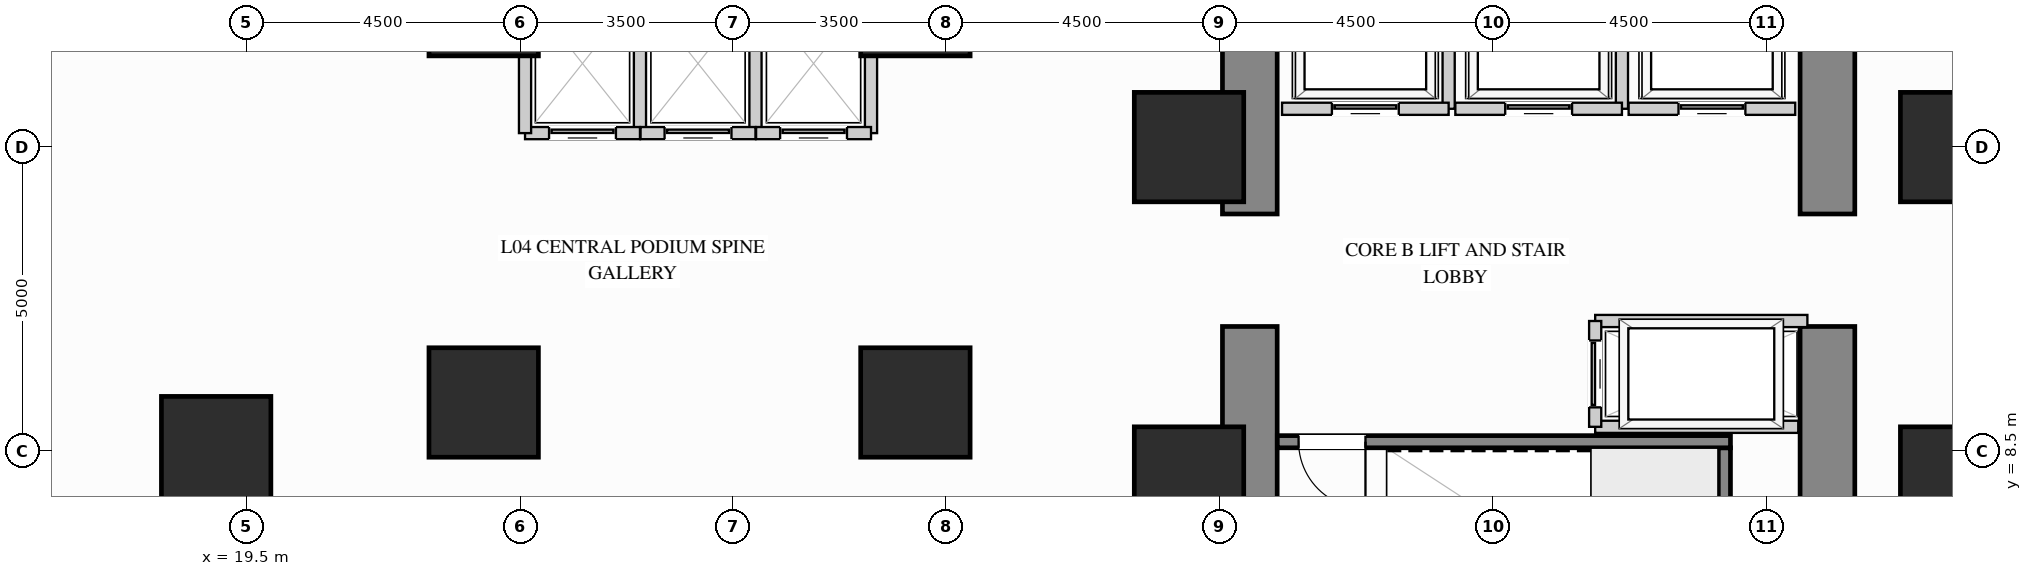
"""IFC4 building model, lengths in metres.
Left out: names, types, materials, properties, quantities, classifications, styles, units other than length and angle.
Written with IfcOpenShell. Run it as: python <this file> out.ifc"""

import sys

from ifc_helpers import new_model, si_unit, direction, frame, frame_2d, origin, origin_2d, place, context, subcontext, project, spatial, rectangle, extrude, source, transform, mapped, element, fill, save


model = new_model("IFC4")
c1 = context("Model", 3, precision=1e-05, world=origin(), true_north=direction((0.0, 1.0)))
c2 = subcontext(c1, "Body", "Model", "MODEL_VIEW")
j1 = project(units=[si_unit("LENGTHUNIT", "METRE"), si_unit("PLANEANGLEUNIT", "RADIAN")], contexts=[c1])
p1 = place(None, origin())
s1 = spatial("IfcSite", under=j1, at=p1, CompositionType="ELEMENT")
p2 = place(p1, origin())
s2 = spatial("IfcBuilding", under=s1, at=p2, CompositionType="ELEMENT")
p3 = place(p2, frame((0.0, 0.0, 18.0)))
s3 = spatial("IfcBuildingStorey", under=s2, at=p3, CompositionType="ELEMENT", Elevation=18.0)
m1 = source(origin(), c2, "Body", "SweptSolid", [
    extrude(rectangle(XDim=1.8, YDim=1.8, at=origin_2d()), origin(), (0.0, 0.0, 1.0), 4.28),
])
for number, where, z_axis, x_axis in (
    (1, (47.6, 8.0, 0.0), (0.0, 0.0, 1.0), (1.0, 0.0, 0.0)),
    (2, (47.6, 13.5, 0.0), (0.0, 0.0, 1.0), (1.0, 0.0, 0.0)),
    (3, (19.0, 8.5, 0.0), (0.0, 0.0, 1.0), (1.0, 0.0, 0.0)),
    (4, (35.0, 8.0, 0.0), (0.0, 0.0, 1.0), (1.0, 0.0, 0.0)),
    (5, (35.0, 13.5, 0.0), (0.0, 0.0, 1.0), (1.0, 0.0, 0.0)),
    (6, (23.4, 9.3, 0.0), (0.0, 0.0, 1.0), (1.0, 0.0, 0.0)),
    (7, (30.5, 9.3, 0.0), (0.0, 0.0, 1.0), (1.0, 0.0, 0.0)),
    (8, (23.4, 15.9, 0.0), (0.0, 0.0, 1.0), (1.0, 0.0, 0.0)),
    (9, (30.5, 15.9, 0.0), (0.0, 0.0, 1.0), (1.0, 0.0, 0.0)),
):
    element("IfcColumn", number, at=place(p3, frame(where, z_axis=z_axis, x_axis=x_axis)), inside=s3, PredefinedType="COLUMN", context=c2, shape_type="MappedRepresentation", body=[
        mapped(m1, transform((0.0, 0.0, 0.0), x_axis=(1.0, 0.0, 0.0), y_axis=(0.0, 1.0, 0.0), z_axis=(0.0, 0.0, 1.0))),
    ])
m2 = source(origin(), c2, "Body", "SweptSolid", [
    extrude(rectangle(XDim=5.6, YDim=0.9, at=frame_2d((2.8, 0.0))), origin(), (0.0, 0.0, 1.0), 4.28),
])
p4 = place(p3, frame((45.5, 4.95, 0.0), z_axis=(0.0, 0.0, 1.0), x_axis=(0.0, 1.0, 0.0)))
e10 = element("IfcWall", 10, at=p4, inside=s3, PredefinedType="SHEAR", context=c2, shape_type="MappedRepresentation", body=[
    mapped(m2, transform((0.0, 0.0, 0.0), x_axis=(1.0, 0.0, 0.0), y_axis=(0.0, 1.0, 0.0), z_axis=(0.0, 0.0, 1.0))),
])
m3 = source(origin(), c2, "Body", "SweptSolid", [
    extrude(rectangle(XDim=3.65, YDim=0.9, at=frame_2d((1.825, 0.0))), origin(), (0.0, 0.0, 1.0), 4.28),
])
p5 = place(p3, frame((45.5, 12.4, 0.0), z_axis=(0.0, 0.0, 1.0), x_axis=(0.0, 1.0, 0.0)))
e11 = element("IfcWall", 11, at=p5, inside=s3, PredefinedType="SHEAR", context=c2, shape_type="MappedRepresentation", body=[
    mapped(m3, transform((0.0, 0.0, 0.0), x_axis=(1.0, 0.0, 0.0), y_axis=(0.0, 1.0, 0.0), z_axis=(0.0, 0.0, 1.0))),
])
p6 = place(p3, frame((36.0, 4.95, 0.0), z_axis=(0.0, 0.0, 1.0), x_axis=(0.0, 1.0, 0.0)))
e12 = element("IfcWall", 12, at=p6, inside=s3, PredefinedType="SHEAR", context=c2, shape_type="MappedRepresentation", body=[
    mapped(m2, transform((0.0, 0.0, 0.0), x_axis=(1.0, 0.0, 0.0), y_axis=(0.0, 1.0, 0.0), z_axis=(0.0, 0.0, 1.0))),
])
p7 = place(p3, frame((36.0, 12.4, 0.0), z_axis=(0.0, 0.0, 1.0), x_axis=(0.0, 1.0, 0.0)))
e13 = element("IfcWall", 13, at=p7, inside=s3, PredefinedType="SHEAR", context=c2, shape_type="MappedRepresentation", body=[
    mapped(m3, transform((0.0, 0.0, 0.0), x_axis=(1.0, 0.0, 0.0), y_axis=(0.0, 1.0, 0.0), z_axis=(0.0, 0.0, 1.0))),
])
m4 = source(origin(), c2, "Body", "SweptSolid", [
    extrude(rectangle(XDim=1.89, YDim=0.2, at=frame_2d((0.945, 0.0))), origin(), (0.0, 0.0, 1.0), 4.265),
])
p8 = place(p3, frame((39.27, 14.13, 0.0), z_axis=(0.0, 0.0, 1.0), x_axis=(0.0, 1.0, 0.0)))
e14 = element("IfcWall", 14, at=p8, inside=s3, PredefinedType="PARTITIONING", context=c2, shape_type="MappedRepresentation", body=[
    mapped(m4, transform((0.0, 0.0, 0.0), x_axis=(1.0, 0.0, 0.0), y_axis=(0.0, 1.0, 0.0), z_axis=(0.0, 0.0, 1.0))),
])
p9 = place(p3, frame((36.53, 14.13, 0.0), z_axis=(0.0, 0.0, 1.0), x_axis=(1.0, 0.0, 0.0)))
e15 = element("IfcWall", 15, at=p9, inside=s3, PredefinedType="PARTITIONING", context=c2, shape_type="SweptSolid", body=[
    extrude(rectangle(XDim=2.74, YDim=0.2, at=frame_2d((1.37, 0.0))), origin(), (0.0, 0.0, 1.0), 4.265),
])
p10 = place(p9, frame((0.82, 0.0, 0.0)))
e16 = element("IfcOpeningElement", 16, at=p10, cuts=e15, PredefinedType="OPENING", context=c2, shape_type="SweptSolid", body=[
    extrude(rectangle(XDim=1.1, YDim=2.2, at=frame_2d((0.55, 1.1))), frame((0.0, 0.11, 0.0), z_axis=(0.0, -1.0, 0.0), x_axis=(1.0, 0.0, 0.0)), (0.0, 0.0, 1.0), 0.22),
])
p11 = place(p3, frame((42.12, 14.13, 0.0), z_axis=(0.0, 0.0, 1.0), x_axis=(0.0, 1.0, 0.0)))
e17 = element("IfcWall", 17, at=p11, inside=s3, PredefinedType="PARTITIONING", context=c2, shape_type="MappedRepresentation", body=[
    mapped(m4, transform((0.0, 0.0, 0.0), x_axis=(1.0, 0.0, 0.0), y_axis=(0.0, 1.0, 0.0), z_axis=(0.0, 0.0, 1.0))),
])
p12 = place(p3, frame((39.38, 14.13, 0.0), z_axis=(0.0, 0.0, 1.0), x_axis=(1.0, 0.0, 0.0)))
e18 = element("IfcWall", 18, at=p12, inside=s3, PredefinedType="PARTITIONING", context=c2, shape_type="SweptSolid", body=[
    extrude(rectangle(XDim=2.74, YDim=0.2, at=frame_2d((1.37, 0.0))), origin(), (0.0, 0.0, 1.0), 4.265),
])
p13 = place(p12, frame((0.82, 0.0, 0.0)))
e19 = element("IfcOpeningElement", 19, at=p13, cuts=e18, PredefinedType="OPENING", context=c2, shape_type="SweptSolid", body=[
    extrude(rectangle(XDim=1.1, YDim=2.2, at=frame_2d((0.55, 1.1))), frame((0.0, 0.11, 0.0), z_axis=(0.0, -1.0, 0.0), x_axis=(1.0, 0.0, 0.0)), (0.0, 0.0, 1.0), 0.22),
])
p14 = place(p3, frame((42.23, 14.13, 0.0), z_axis=(0.0, 0.0, 1.0), x_axis=(1.0, 0.0, 0.0)))
e20 = element("IfcWall", 20, at=p14, inside=s3, PredefinedType="PARTITIONING", context=c2, shape_type="SweptSolid", body=[
    extrude(rectangle(XDim=2.74, YDim=0.2, at=frame_2d((1.37, 0.0))), origin(), (0.0, 0.0, 1.0), 4.265),
])
p15 = place(p14, frame((0.82, 0.0, 0.0)))
e21 = element("IfcOpeningElement", 21, at=p15, cuts=e20, PredefinedType="OPENING", context=c2, shape_type="SweptSolid", body=[
    extrude(rectangle(XDim=1.1, YDim=2.2, at=frame_2d((0.55, 1.1))), frame((0.0, 0.11, 0.0), z_axis=(0.0, -1.0, 0.0), x_axis=(1.0, 0.0, 0.0)), (0.0, 0.0, 1.0), 0.22),
])
m5 = source(origin(), c2, "Body", "SweptSolid", [
    extrude(rectangle(XDim=2.29, YDim=0.2, at=frame_2d((1.145, 0.0))), origin(), (0.0, 0.0, 1.0), 4.265),
])
p16 = place(p3, frame((25.97, 13.73, 0.0), z_axis=(0.0, 0.0, 1.0), x_axis=(0.0, 1.0, 0.0)))
e22 = element("IfcWall", 22, at=p16, inside=s3, PredefinedType="PARTITIONING", context=c2, shape_type="MappedRepresentation", body=[
    mapped(m5, transform((0.0, 0.0, 0.0), x_axis=(1.0, 0.0, 0.0), y_axis=(0.0, 1.0, 0.0), z_axis=(0.0, 0.0, 1.0))),
])
p17 = place(p3, frame((24.08, 13.73, 0.0), z_axis=(0.0, 0.0, 1.0), x_axis=(1.0, 0.0, 0.0)))
e23 = element("IfcWall", 23, at=p17, inside=s3, PredefinedType="PARTITIONING", context=c2, shape_type="SweptSolid", body=[
    extrude(rectangle(XDim=1.89, YDim=0.2, at=frame_2d((0.945, 0.0))), origin(), (0.0, 0.0, 1.0), 4.265),
])
p18 = place(p17, frame((0.395, 0.0, 0.0)))
e24 = element("IfcOpeningElement", 24, at=p18, cuts=e23, PredefinedType="OPENING", context=c2, shape_type="SweptSolid", body=[
    extrude(rectangle(XDim=1.1, YDim=2.2, at=frame_2d((0.55, 1.1))), frame((0.0, 0.11, 0.0), z_axis=(0.0, -1.0, 0.0), x_axis=(1.0, 0.0, 0.0)), (0.0, 0.0, 1.0), 0.22),
])
for number, where, z_axis, x_axis in (
    (25, (24.08, 13.73, 0.0), (0.0, 0.0, 1.0), (0.0, 1.0, 0.0)),
    (26, (27.87, 13.73, 0.0), (0.0, 0.0, 1.0), (0.0, 1.0, 0.0)),
):
    element("IfcWall", number, at=place(p3, frame(where, z_axis=z_axis, x_axis=x_axis)), inside=s3, PredefinedType="PARTITIONING", context=c2, shape_type="MappedRepresentation", body=[
        mapped(m5, transform((0.0, 0.0, 0.0), x_axis=(1.0, 0.0, 0.0), y_axis=(0.0, 1.0, 0.0), z_axis=(0.0, 0.0, 1.0))),
    ])
p19 = place(p3, frame((25.98, 13.73, 0.0), z_axis=(0.0, 0.0, 1.0), x_axis=(1.0, 0.0, 0.0)))
e27 = element("IfcWall", 27, at=p19, inside=s3, PredefinedType="PARTITIONING", context=c2, shape_type="SweptSolid", body=[
    extrude(rectangle(XDim=1.89, YDim=0.2, at=frame_2d((0.945, 0.0))), origin(), (0.0, 0.0, 1.0), 4.265),
])
p20 = place(p19, frame((0.395, 0.0, 0.0)))
e28 = element("IfcOpeningElement", 28, at=p20, cuts=e27, PredefinedType="OPENING", context=c2, shape_type="SweptSolid", body=[
    extrude(rectangle(XDim=1.1, YDim=2.2, at=frame_2d((0.55, 1.1))), frame((0.0, 0.11, 0.0), z_axis=(0.0, -1.0, 0.0), x_axis=(1.0, 0.0, 0.0)), (0.0, 0.0, 1.0), 0.22),
])
p21 = place(p3, frame((29.77, 13.73, 0.0), z_axis=(0.0, 0.0, 1.0), x_axis=(0.0, 1.0, 0.0)))
e29 = element("IfcWall", 29, at=p21, inside=s3, PredefinedType="PARTITIONING", context=c2, shape_type="MappedRepresentation", body=[
    mapped(m5, transform((0.0, 0.0, 0.0), x_axis=(1.0, 0.0, 0.0), y_axis=(0.0, 1.0, 0.0), z_axis=(0.0, 0.0, 1.0))),
])
p22 = place(p3, frame((27.88, 13.73, 0.0), z_axis=(0.0, 0.0, 1.0), x_axis=(1.0, 0.0, 0.0)))
e30 = element("IfcWall", 30, at=p22, inside=s3, PredefinedType="PARTITIONING", context=c2, shape_type="SweptSolid", body=[
    extrude(rectangle(XDim=1.89, YDim=0.2, at=frame_2d((0.945, 0.0))), origin(), (0.0, 0.0, 1.0), 4.265),
])
p23 = place(p22, frame((0.395, 0.0, 0.0)))
e31 = element("IfcOpeningElement", 31, at=p23, cuts=e30, PredefinedType="OPENING", context=c2, shape_type="SweptSolid", body=[
    extrude(rectangle(XDim=1.1, YDim=2.2, at=frame_2d((0.55, 1.1))), frame((0.0, 0.11, 0.0), z_axis=(0.0, -1.0, 0.0), x_axis=(1.0, 0.0, 0.0)), (0.0, 0.0, 1.0), 0.22),
])
m6 = source(origin(), c2, "Body", "SweptSolid", [
    extrude(rectangle(XDim=3.49, YDim=0.2, at=frame_2d((1.745, 0.0))), origin(), (0.0, 0.0, 1.0), 4.265),
])
p24 = place(p3, frame((41.68, 10.64, 0.0), z_axis=(0.0, 0.0, 1.0), x_axis=(1.0, 0.0, 0.0)))
e32 = element("IfcWall", 32, at=p24, inside=s3, PredefinedType="PARTITIONING", context=c2, shape_type="MappedRepresentation", body=[
    mapped(m6, transform((0.0, 0.0, 0.0), x_axis=(1.0, 0.0, 0.0), y_axis=(0.0, 1.0, 0.0), z_axis=(0.0, 0.0, 1.0))),
])
m7 = source(origin(), c2, "Body", "SweptSolid", [
    extrude(rectangle(XDim=3.34, YDim=0.2, at=frame_2d((1.67, 0.0))), origin(), (0.0, 0.0, 1.0), 4.265),
])
p25 = place(p3, frame((41.68, 8.9, 0.0), z_axis=(0.0, 0.0, 1.0), x_axis=(1.0, 0.0, 0.0)))
e33 = element("IfcWall", 33, at=p25, inside=s3, PredefinedType="PARTITIONING", context=c2, shape_type="MappedRepresentation", body=[
    mapped(m7, transform((0.0, 0.0, 0.0), x_axis=(1.0, 0.0, 0.0), y_axis=(0.0, 1.0, 0.0), z_axis=(0.0, 0.0, 1.0))),
])
p26 = place(p3, frame((41.68, 8.9, 0.0), z_axis=(0.0, 0.0, 1.0), x_axis=(0.0, 1.0, 0.0)))
e34 = element("IfcWall", 34, at=p26, inside=s3, PredefinedType="PARTITIONING", context=c2, shape_type="SweptSolid", body=[
    extrude(rectangle(XDim=1.74, YDim=0.2, at=frame_2d((0.87, 0.0))), origin(), (0.0, 0.0, 1.0), 4.265),
])
p27 = place(p26, frame((0.32, 0.0, 0.0)))
e35 = element("IfcOpeningElement", 35, at=p27, cuts=e34, PredefinedType="OPENING", context=c2, shape_type="SweptSolid", body=[
    extrude(rectangle(XDim=1.1, YDim=2.2, at=frame_2d((0.55, 1.1))), frame((0.0, 0.11, 0.0), z_axis=(0.0, -1.0, 0.0), x_axis=(1.0, 0.0, 0.0)), (0.0, 0.0, 1.0), 0.22),
])
m8 = source(origin(), c2, "Body", "SweptSolid", [
    extrude(rectangle(XDim=3.603, YDim=0.2, at=frame_2d((1.802, 0.0))), origin(), (0.0, 0.0, 1.0), 4.28),
])
p28 = place(p3, frame((43.805, 4.952, 0.0), z_axis=(0.0, 0.0, 1.0), x_axis=(0.0, 1.0, 0.0)))
e36 = element("IfcWall", 36, at=p28, inside=s3, PredefinedType="SHEAR", context=c2, shape_type="MappedRepresentation", body=[
    mapped(m8, transform((0.0, 0.0, 0.0), x_axis=(1.0, 0.0, 0.0), y_axis=(0.0, 1.0, 0.0), z_axis=(0.0, 0.0, 1.0))),
])
p29 = place(p3, frame((36.452, 8.655, 0.0), z_axis=(0.0, 0.0, 1.0), x_axis=(1.0, 0.0, 0.0)))
e37 = element("IfcWall", 37, at=p29, inside=s3, PredefinedType="SHEAR", context=c2, shape_type="SweptSolid", body=[
    extrude(rectangle(XDim=7.453, YDim=0.2, at=frame_2d((3.727, 0.0))), origin(), (0.0, 0.0, 1.0), 4.28),
])
p30 = place(p29, frame((0.35, 0.0, 0.0)))
e38 = element("IfcOpeningElement", 38, at=p30, cuts=e37, PredefinedType="OPENING", context=c2, shape_type="SweptSolid", body=[
    extrude(rectangle(XDim=1.1, YDim=2.15, at=frame_2d((0.55, 1.075))), frame((0.0, 0.11, 0.0), z_axis=(0.0, -1.0, 0.0), x_axis=(1.0, 0.0, 0.0)), (0.0, 0.0, 1.0), 0.22),
])
m9 = source(origin(), c2, "Body", "SweptSolid", [
    extrude(rectangle(XDim=1.1, YDim=2.2, at=frame_2d((0.55, 1.1))), frame((0.0, 0.025, 0.0), z_axis=(0.0, -1.0, 0.0), x_axis=(1.0, 0.0, 0.0)), (0.0, 0.0, 1.0), 0.05),
])
p31 = place(p10, origin())
e39 = element("IfcDoor", 39, at=p31, inside=s3, OperationType="SLIDING_TO_LEFT", PredefinedType="DOOR", context=c2, shape_type="MappedRepresentation", body=[
    mapped(m9, transform((0.0, 0.0, 0.0), x_axis=(1.0, 0.0, 0.0), y_axis=(0.0, 1.0, 0.0), z_axis=(0.0, 0.0, 1.0))),
])
fill(e16, e39)
p32 = place(p13, origin())
e40 = element("IfcDoor", 40, at=p32, inside=s3, OperationType="SLIDING_TO_LEFT", PredefinedType="DOOR", context=c2, shape_type="MappedRepresentation", body=[
    mapped(m9, transform((0.0, 0.0, 0.0), x_axis=(1.0, 0.0, 0.0), y_axis=(0.0, 1.0, 0.0), z_axis=(0.0, 0.0, 1.0))),
])
fill(e19, e40)
p33 = place(p15, origin())
e41 = element("IfcDoor", 41, at=p33, inside=s3, OperationType="SLIDING_TO_LEFT", PredefinedType="DOOR", context=c2, shape_type="MappedRepresentation", body=[
    mapped(m9, transform((0.0, 0.0, 0.0), x_axis=(1.0, 0.0, 0.0), y_axis=(0.0, 1.0, 0.0), z_axis=(0.0, 0.0, 1.0))),
])
fill(e21, e41)
p34 = place(p18, origin())
e42 = element("IfcDoor", 42, at=p34, inside=s3, OperationType="SLIDING_TO_LEFT", PredefinedType="DOOR", context=c2, shape_type="MappedRepresentation", body=[
    mapped(m9, transform((0.0, 0.0, 0.0), x_axis=(1.0, 0.0, 0.0), y_axis=(0.0, 1.0, 0.0), z_axis=(0.0, 0.0, 1.0))),
])
fill(e24, e42)
p35 = place(p20, origin())
e43 = element("IfcDoor", 43, at=p35, inside=s3, OperationType="SLIDING_TO_LEFT", PredefinedType="DOOR", context=c2, shape_type="MappedRepresentation", body=[
    mapped(m9, transform((0.0, 0.0, 0.0), x_axis=(1.0, 0.0, 0.0), y_axis=(0.0, 1.0, 0.0), z_axis=(0.0, 0.0, 1.0))),
])
fill(e28, e43)
p36 = place(p23, origin())
e44 = element("IfcDoor", 44, at=p36, inside=s3, OperationType="SLIDING_TO_LEFT", PredefinedType="DOOR", context=c2, shape_type="MappedRepresentation", body=[
    mapped(m9, transform((0.0, 0.0, 0.0), x_axis=(1.0, 0.0, 0.0), y_axis=(0.0, 1.0, 0.0), z_axis=(0.0, 0.0, 1.0))),
])
fill(e31, e44)
p37 = place(p27, origin())
e45 = element("IfcDoor", 45, at=p37, inside=s3, OperationType="SLIDING_TO_LEFT", PredefinedType="DOOR", context=c2, shape_type="MappedRepresentation", body=[
    mapped(m9, transform((0.0, 0.0, 0.0), x_axis=(1.0, 0.0, 0.0), y_axis=(0.0, 1.0, 0.0), z_axis=(0.0, 0.0, 1.0))),
])
fill(e35, e45)
m10 = source(origin(), c2, "Body", "SweptSolid", [
    extrude(rectangle(XDim=1.1, YDim=2.15, at=frame_2d((0.55, 1.075))), frame((0.0, 0.025, 0.0), z_axis=(0.0, -1.0, 0.0), x_axis=(1.0, 0.0, 0.0)), (0.0, 0.0, 1.0), 0.05),
])
p38 = place(p30, origin())
e46 = element("IfcDoor", 46, at=p38, inside=s3, OperationType="SINGLE_SWING_RIGHT", PredefinedType="DOOR", context=c2, shape_type="MappedRepresentation", body=[
    mapped(m10, transform((0.0, 0.0, 0.0), x_axis=(1.0, 0.0, 0.0), y_axis=(0.0, 1.0, 0.0), z_axis=(0.0, 0.0, 1.0))),
])
fill(e38, e46)
save(model, sys.argv[1])
